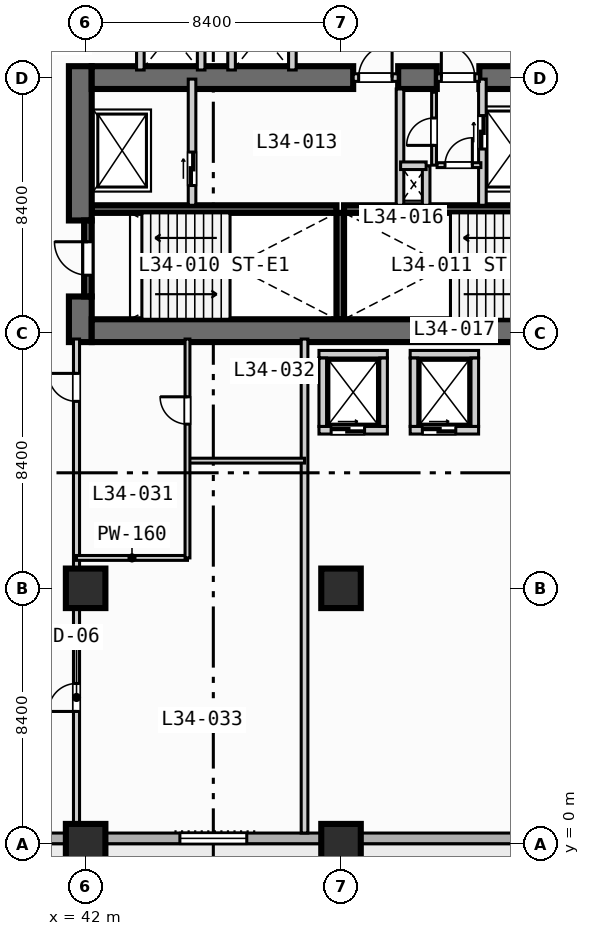
"""IFC4 building model, lengths in metres.
Left out: names, types, materials, properties, quantities, classifications, styles, units other than length and angle.
Written with IfcOpenShell. Run it as: python <this file> out.ifc"""

import sys

from ifc_helpers import new_model, si_unit, direction, frame, frame_2d, origin, origin_2d, place, context, subcontext, project, spatial, rectangle, extrude, element, fill, save


model = new_model("IFC4")
c1 = context("Model", 3, precision=1e-05, world=origin(), true_north=direction((0.0, 1.0)))
c2 = subcontext(c1, "Body", "Model", "MODEL_VIEW")
j1 = project(units=[si_unit("LENGTHUNIT", "METRE"), si_unit("PLANEANGLEUNIT", "RADIAN")], contexts=[c1])
p1 = place(None, origin())
s1 = spatial("IfcSite", under=j1, at=p1, CompositionType="ELEMENT")
p2 = place(p1, origin())
s2 = spatial("IfcBuilding", under=s1, at=p2, CompositionType="ELEMENT")
p3 = place(p2, frame((0.0, 0.0, 141.8)))
s3 = spatial("IfcBuildingStorey", under=s2, at=p3, CompositionType="ELEMENT", Elevation=141.8)
for number, where, z_axis, x_axis in (
    (1, (42.2, 20.875, 0.0), (0.0, 0.0, 1.0), (1.0, 0.0, 0.0)),
    (2, (50.5, 20.875, 0.0), (0.0, 0.0, 1.0), (1.0, 0.0, 0.0)),
):
    element("IfcWall", number, at=place(p3, frame(where, z_axis=z_axis, x_axis=x_axis)), inside=s3, PredefinedType="SOLIDWALL", context=c2, shape_type="SweptSolid", body=[
        extrude(rectangle(XDim=8.05, YDim=0.25, at=frame_2d((4.025, 0.0))), origin(), (0.0, 0.0, 1.0), 3.55),
    ])
p4 = place(p3, frame((50.375, 17.25, 0.0), z_axis=(0.0, 0.0, 1.0), x_axis=(0.0, 1.0, 0.0)))
e3 = element("IfcWall", 3, at=p4, inside=s3, PredefinedType="SOLIDWALL", context=c2, shape_type="SweptSolid", body=[
    extrude(rectangle(XDim=3.5, YDim=0.25, at=frame_2d((1.75, 0.0))), origin(), (0.0, 0.0, 1.0), 3.55),
])
p5 = place(p3, frame((41.825, 16.5, 0.0), z_axis=(0.0, 0.0, 1.0), x_axis=(0.0, 1.0, 0.0)))
e4 = element("IfcWall", 4, at=p5, inside=s3, PredefinedType="SHEAR", context=c2, shape_type="SweptSolid", body=[
    extrude(rectangle(XDim=1.5, YDim=0.75, at=frame_2d((0.75, 0.0))), origin(), (0.0, 0.0, 1.0), 3.55),
])
p6 = place(p3, frame((41.825, 20.5, 0.0), z_axis=(0.0, 0.0, 1.0), x_axis=(0.0, 1.0, 0.0)))
e5 = element("IfcWall", 5, at=p6, inside=s3, PredefinedType="SHEAR", context=c2, shape_type="SweptSolid", body=[
    extrude(rectangle(XDim=5.075, YDim=0.75, at=frame_2d((2.538, 0.0))), origin(), (0.0, 0.0, 1.0), 3.55),
])
p7 = place(p3, frame((42.2, 16.875, 0.0), z_axis=(0.0, 0.0, 1.0), x_axis=(1.0, 0.0, 0.0)))
e6 = element("IfcWall", 6, at=p7, inside=s3, PredefinedType="SHEAR", context=c2, shape_type="SweptSolid", body=[
    extrude(rectangle(XDim=16.35, YDim=0.75, at=frame_2d((8.175, 0.0))), origin(), (0.0, 0.0, 1.0), 3.55),
])
p8 = place(p3, frame((42.2, 25.2, 0.0), z_axis=(0.0, 0.0, 1.0), x_axis=(1.0, 0.0, 0.0)))
e7 = element("IfcWall", 7, at=p8, inside=s3, PredefinedType="SHEAR", context=c2, shape_type="SweptSolid", body=[
    extrude(rectangle(XDim=8.6, YDim=0.75, at=frame_2d((4.3, 0.0))), origin(), (0.0, 0.0, 1.0), 3.55),
])
p9 = place(p3, frame((52.28, 25.2, 0.0), z_axis=(0.0, 0.0, 1.0), x_axis=(1.0, 0.0, 0.0)))
e8 = element("IfcWall", 8, at=p9, inside=s3, PredefinedType="SHEAR", context=c2, shape_type="SweptSolid", body=[
    extrude(rectangle(XDim=1.27, YDim=0.75, at=frame_2d((0.635, 0.0))), origin(), (0.0, 0.0, 1.0), 3.55),
])
p10 = place(p3, frame((54.95, 25.2, 0.0), z_axis=(0.0, 0.0, 1.0), x_axis=(1.0, 0.0, 0.0)))
e9 = element("IfcWall", 9, at=p10, inside=s3, PredefinedType="SHEAR", context=c2, shape_type="SweptSolid", body=[
    extrude(rectangle(XDim=3.6, YDim=0.75, at=frame_2d((1.8, 0.0))), origin(), (0.0, 0.0, 1.0), 3.55),
])
for number, where, z_axis, x_axis in (
    (10, (42.0, 0.0, 0.0), (0.0, 0.0, 1.0), (1.0, 0.0, 0.0)),
    (11, (42.0, 8.4, 0.0), (0.0, 0.0, 1.0), (1.0, 0.0, 0.0)),
    (12, (50.4, 0.0, 0.0), (0.0, 0.0, 1.0), (1.0, 0.0, 0.0)),
    (13, (50.4, 8.4, 0.0), (0.0, 0.0, 1.0), (1.0, 0.0, 0.0)),
):
    element("IfcColumn", number, at=place(p3, frame(where, z_axis=z_axis, x_axis=x_axis)), inside=s3, PredefinedType="COLUMN", context=c2, shape_type="SweptSolid", body=[
        extrude(rectangle(XDim=1.3, YDim=1.3, at=origin_2d()), origin(), (0.0, 0.0, 1.0), 3.8),
    ])
p11 = place(p3, frame((72.425, 0.175, 0.0), z_axis=(0.0, 0.0, 1.0), x_axis=(-1.0, 0.0, 0.0)))
e14 = element("IfcWall", 14, at=p11, inside=s3, PredefinedType="STANDARD", context=c2, shape_type="SweptSolid", body=[
    extrude(rectangle(XDim=69.25, YDim=0.35, at=frame_2d((34.625, 0.0))), origin(), (0.0, 0.0, 1.0), 3.55),
])
p12 = place(p11, frame((51.725, 0.0, 0.0)))
e15 = element("IfcOpeningElement", 15, at=p12, cuts=e14, PredefinedType="OPENING", context=c2, shape_type="SweptSolid", body=[
    extrude(rectangle(XDim=1.4, YDim=2.2, at=frame_2d((0.7, 1.1))), frame((0.0, 0.185, 0.0), z_axis=(0.0, -1.0, 0.0), x_axis=(1.0, 0.0, 0.0)), (0.0, 0.0, 1.0), 0.37),
])
p13 = place(p11, frame((58.725, 0.0, 0.85)))
e16 = element("IfcOpeningElement", 16, at=p13, cuts=e14, PredefinedType="OPENING", context=c2, shape_type="SweptSolid", body=[
    extrude(rectangle(XDim=2.2, YDim=1.8, at=frame_2d((1.1, 0.9))), frame((0.0, 0.185, 0.0), z_axis=(0.0, -1.0, 0.0), x_axis=(1.0, 0.0, 0.0)), (0.0, 0.0, 1.0), 0.37),
])
p14 = place(p11, frame((41.925, 0.0, 0.85)))
e17 = element("IfcOpeningElement", 17, at=p14, cuts=e14, PredefinedType="OPENING", context=c2, shape_type="SweptSolid", body=[
    extrude(rectangle(XDim=2.2, YDim=1.8, at=frame_2d((1.1, 0.9))), frame((0.0, 0.185, 0.0), z_axis=(0.0, -1.0, 0.0), x_axis=(1.0, 0.0, 0.0)), (0.0, 0.0, 1.0), 0.37),
])
p15 = place(p11, frame((33.525, 0.0, 0.85)))
e18 = element("IfcOpeningElement", 18, at=p15, cuts=e14, PredefinedType="OPENING", context=c2, shape_type="SweptSolid", body=[
    extrude(rectangle(XDim=2.2, YDim=1.8, at=frame_2d((1.1, 0.9))), frame((0.0, 0.185, 0.0), z_axis=(0.0, -1.0, 0.0), x_axis=(1.0, 0.0, 0.0)), (0.0, 0.0, 1.0), 0.37),
])
p16 = place(p11, frame((25.125, 0.0, 0.85)))
e19 = element("IfcOpeningElement", 19, at=p16, cuts=e14, PredefinedType="OPENING", context=c2, shape_type="SweptSolid", body=[
    extrude(rectangle(XDim=2.2, YDim=1.8, at=frame_2d((1.1, 0.9))), frame((0.0, 0.185, 0.0), z_axis=(0.0, -1.0, 0.0), x_axis=(1.0, 0.0, 0.0)), (0.0, 0.0, 1.0), 0.37),
])
p17 = place(p3, frame((42.075, 18.0, 0.0), z_axis=(0.0, 0.0, 1.0), x_axis=(0.0, 1.0, 0.0)))
e20 = element("IfcWall", 20, at=p17, inside=s3, PredefinedType="SOLIDWALL", context=c2, shape_type="SweptSolid", body=[
    extrude(rectangle(XDim=2.5, YDim=0.25, at=frame_2d((1.25, 0.0))), origin(), (0.0, 0.0, 1.0), 3.55),
])
p18 = place(p17, frame((0.7, 0.0, 0.0)))
e21 = element("IfcOpeningElement", 21, at=p18, cuts=e20, PredefinedType="OPENING", context=c2, shape_type="SweptSolid", body=[
    extrude(rectangle(XDim=1.1, YDim=2.15, at=frame_2d((0.55, 1.075))), frame((0.0, 0.135, 0.0), z_axis=(0.0, -1.0, 0.0), x_axis=(1.0, 0.0, 0.0)), (0.0, 0.0, 1.0), 0.27),
])
p19 = place(p3, frame((45.5, 21.0, 0.0), z_axis=(0.0, 0.0, 1.0), x_axis=(0.0, 1.0, 0.0)))
e22 = element("IfcWall", 22, at=p19, inside=s3, PredefinedType="SOLIDWALL", context=c2, shape_type="SweptSolid", body=[
    extrude(rectangle(XDim=4.15, YDim=0.25, at=frame_2d((2.075, 0.0))), origin(), (0.0, 0.0, 1.0), 3.55),
])
p20 = place(p19, frame((0.65, 0.0, 0.0)))
e23 = element("IfcOpeningElement", 23, at=p20, cuts=e22, PredefinedType="OPENING", context=c2, shape_type="SweptSolid", body=[
    extrude(rectangle(XDim=1.1, YDim=2.15, at=frame_2d((0.55, 1.075))), frame((0.0, 0.135, 0.0), z_axis=(0.0, -1.0, 0.0), x_axis=(1.0, 0.0, 0.0)), (0.0, 0.0, 1.0), 0.27),
])
p21 = place(p3, frame((50.8, 25.2, 0.0), z_axis=(0.0, 0.0, 1.0), x_axis=(1.0, 0.0, 0.0)))
e24 = element("IfcWall", 24, at=p21, inside=s3, PredefinedType="SOLIDWALL", context=c2, shape_type="SweptSolid", body=[
    extrude(rectangle(XDim=1.48, YDim=0.25, at=frame_2d((0.74, 0.0))), origin(), (0.0, 0.0, 1.0), 3.55),
])
p22 = place(p21, frame((0.18, 0.0, 0.0)))
e25 = element("IfcOpeningElement", 25, at=p22, cuts=e24, PredefinedType="OPENING", context=c2, shape_type="SweptSolid", body=[
    extrude(rectangle(XDim=1.1, YDim=2.15, at=frame_2d((0.55, 1.075))), frame((0.0, 0.135, 0.0), z_axis=(0.0, -1.0, 0.0), x_axis=(1.0, 0.0, 0.0)), (0.0, 0.0, 1.0), 0.27),
])
p23 = place(p3, frame((52.34, 21.0, 0.0), z_axis=(0.0, 0.0, 1.0), x_axis=(0.0, 1.0, 0.0)))
e26 = element("IfcWall", 26, at=p23, inside=s3, PredefinedType="SOLIDWALL", context=c2, shape_type="SweptSolid", body=[
    extrude(rectangle(XDim=3.825, YDim=0.25, at=frame_2d((1.913, 0.0))), origin(), (0.0, 0.0, 1.0), 3.55),
])
p24 = place(p3, frame((55.05, 21.0, 0.0), z_axis=(0.0, 0.0, 1.0), x_axis=(0.0, 1.0, 0.0)))
e27 = element("IfcWall", 27, at=p24, inside=s3, PredefinedType="SOLIDWALL", context=c2, shape_type="SweptSolid", body=[
    extrude(rectangle(XDim=4.15, YDim=0.25, at=frame_2d((2.075, 0.0))), origin(), (0.0, 0.0, 1.0), 3.55),
])
p25 = place(p24, frame((1.85, 0.0, 0.0)))
e28 = element("IfcOpeningElement", 28, at=p25, cuts=e27, PredefinedType="OPENING", context=c2, shape_type="SweptSolid", body=[
    extrude(rectangle(XDim=1.1, YDim=2.15, at=frame_2d((0.55, 1.075))), frame((0.0, 0.135, 0.0), z_axis=(0.0, -1.0, 0.0), x_axis=(1.0, 0.0, 0.0)), (0.0, 0.0, 1.0), 0.27),
])
p26 = place(p3, frame((53.55, 25.2, 0.0), z_axis=(0.0, 0.0, 1.0), x_axis=(1.0, 0.0, 0.0)))
e29 = element("IfcWall", 29, at=p26, inside=s3, PredefinedType="SOLIDWALL", context=c2, shape_type="SweptSolid", body=[
    extrude(rectangle(XDim=1.4, YDim=0.25, at=frame_2d((0.7, 0.0))), origin(), (0.0, 0.0, 1.0), 3.55),
])
p27 = place(p26, frame((0.15, 0.0, 0.0)))
e30 = element("IfcOpeningElement", 30, at=p27, cuts=e29, PredefinedType="OPENING", context=c2, shape_type="SweptSolid", body=[
    extrude(rectangle(XDim=1.1, YDim=2.15, at=frame_2d((0.55, 1.075))), frame((0.0, 0.135, 0.0), z_axis=(0.0, -1.0, 0.0), x_axis=(1.0, 0.0, 0.0)), (0.0, 0.0, 1.0), 0.27),
])
p28 = place(p3, frame((53.2, 21.0, 0.0), z_axis=(0.0, 0.0, 1.0), x_axis=(0.0, 1.0, 0.0)))
e31 = element("IfcWall", 31, at=p28, inside=s3, PredefinedType="SOLIDWALL", context=c2, shape_type="SweptSolid", body=[
    extrude(rectangle(XDim=1.3, YDim=0.25, at=frame_2d((0.65, 0.0))), origin(), (0.0, 0.0, 1.0), 3.55),
])
p29 = place(p3, frame((52.36, 22.3, 0.0), z_axis=(0.0, 0.0, 1.0), x_axis=(1.0, 0.0, 0.0)))
e32 = element("IfcWall", 32, at=p29, inside=s3, PredefinedType="SOLIDWALL", context=c2, shape_type="SweptSolid", body=[
    extrude(rectangle(XDim=0.84, YDim=0.25, at=frame_2d((0.42, 0.0))), origin(), (0.0, 0.0, 1.0), 3.55),
])
p30 = place(p3, frame((53.56, 22.32, 0.0), z_axis=(0.0, 0.0, 1.0), x_axis=(1.0, 0.0, 0.0)))
e33 = element("IfcWall", 33, at=p30, inside=s3, PredefinedType="PARTITIONING", context=c2, shape_type="SweptSolid", body=[
    extrude(rectangle(XDim=1.44, YDim=0.16, at=frame_2d((0.72, 0.0))), origin(), (0.0, 0.0, 1.0), 3.55),
])
p31 = place(p30, frame((0.26, 0.0, 0.0)))
e34 = element("IfcOpeningElement", 34, at=p31, cuts=e33, PredefinedType="OPENING", context=c2, shape_type="SweptSolid", body=[
    extrude(rectangle(XDim=0.9, YDim=2.1, at=frame_2d((0.45, 1.05))), frame((0.0, 0.09, 0.0), z_axis=(0.0, -1.0, 0.0), x_axis=(1.0, 0.0, 0.0)), (0.0, 0.0, 1.0), 0.18),
])
p32 = place(p3, frame((53.46, 22.32, 0.0), z_axis=(0.0, 0.0, 1.0), x_axis=(0.0, 1.0, 0.0)))
e35 = element("IfcWall", 35, at=p32, inside=s3, PredefinedType="PARTITIONING", context=c2, shape_type="SweptSolid", body=[
    extrude(rectangle(XDim=2.4, YDim=0.16, at=frame_2d((1.2, 0.0))), origin(), (0.0, 0.0, 1.0), 3.55),
])
p33 = place(p32, frame((0.65, 0.0, 0.0)))
e36 = element("IfcOpeningElement", 36, at=p33, cuts=e35, PredefinedType="OPENING", context=c2, shape_type="SweptSolid", body=[
    extrude(rectangle(XDim=0.9, YDim=2.1, at=frame_2d((0.45, 1.05))), frame((0.0, 0.09, 0.0), z_axis=(0.0, -1.0, 0.0), x_axis=(1.0, 0.0, 0.0)), (0.0, 0.0, 1.0), 0.18),
])
p34 = place(p3, frame((49.675, 13.6, 0.0), z_axis=(0.0, 0.0, 1.0), x_axis=(1.0, 0.0, 0.0)))
e37 = element("IfcWall", 37, at=p34, inside=s3, PredefinedType="SOLIDWALL", context=c2, shape_type="SweptSolid", body=[
    extrude(rectangle(XDim=2.25, YDim=0.25, at=frame_2d((1.125, 0.0))), origin(), (0.0, 0.0, 1.0), 3.55),
])
p35 = place(p34, frame((0.4, 0.0, 0.0)))
e38 = element("IfcOpeningElement", 38, at=p35, cuts=e37, PredefinedType="OPENING", context=c2, shape_type="SweptSolid", body=[
    extrude(rectangle(XDim=1.1, YDim=2.15, at=frame_2d((0.55, 1.075))), frame((0.0, 0.135, 0.0), z_axis=(0.0, -1.0, 0.0), x_axis=(1.0, 0.0, 0.0)), (0.0, 0.0, 1.0), 0.27),
])
for number, where, z_axis, x_axis in (
    (39, (49.675, 16.1, 0.0), (0.0, 0.0, 1.0), (1.0, 0.0, 0.0)),
    (40, (49.8, 13.725, 0.0), (0.0, 0.0, 1.0), (0.0, 1.0, 0.0)),
    (41, (51.8, 13.725, 0.0), (0.0, 0.0, 1.0), (0.0, 1.0, 0.0)),
):
    element("IfcWall", number, at=place(p3, frame(where, z_axis=z_axis, x_axis=x_axis)), inside=s3, PredefinedType="SOLIDWALL", context=c2, shape_type="SweptSolid", body=[
        extrude(rectangle(XDim=2.25, YDim=0.25, at=frame_2d((1.125, 0.0))), origin(), (0.0, 0.0, 1.0), 3.55),
    ])
p36 = place(p3, frame((52.675, 13.6, 0.0), z_axis=(0.0, 0.0, 1.0), x_axis=(1.0, 0.0, 0.0)))
e42 = element("IfcWall", 42, at=p36, inside=s3, PredefinedType="SOLIDWALL", context=c2, shape_type="SweptSolid", body=[
    extrude(rectangle(XDim=2.25, YDim=0.25, at=frame_2d((1.125, 0.0))), origin(), (0.0, 0.0, 1.0), 3.55),
])
p37 = place(p36, frame((0.4, 0.0, 0.0)))
e43 = element("IfcOpeningElement", 43, at=p37, cuts=e42, PredefinedType="OPENING", context=c2, shape_type="SweptSolid", body=[
    extrude(rectangle(XDim=1.1, YDim=2.15, at=frame_2d((0.55, 1.075))), frame((0.0, 0.135, 0.0), z_axis=(0.0, -1.0, 0.0), x_axis=(1.0, 0.0, 0.0)), (0.0, 0.0, 1.0), 0.27),
])
for number, where, z_axis, x_axis in (
    (44, (52.675, 16.1, 0.0), (0.0, 0.0, 1.0), (1.0, 0.0, 0.0)),
    (45, (52.8, 13.725, 0.0), (0.0, 0.0, 1.0), (0.0, 1.0, 0.0)),
    (46, (54.8, 13.725, 0.0), (0.0, 0.0, 1.0), (0.0, 1.0, 0.0)),
):
    element("IfcWall", number, at=place(p3, frame(where, z_axis=z_axis, x_axis=x_axis)), inside=s3, PredefinedType="SOLIDWALL", context=c2, shape_type="SweptSolid", body=[
        extrude(rectangle(XDim=2.25, YDim=0.25, at=frame_2d((1.125, 0.0))), origin(), (0.0, 0.0, 1.0), 3.55),
    ])
for number, where, z_axis, x_axis in (
    (47, (43.8, 25.45, 0.0), (0.0, 0.0, 1.0), (0.0, 1.0, 0.0)),
    (48, (45.8, 25.45, 0.0), (0.0, 0.0, 1.0), (0.0, 1.0, 0.0)),
    (49, (46.8, 25.45, 0.0), (0.0, 0.0, 1.0), (0.0, 1.0, 0.0)),
    (50, (48.8, 25.45, 0.0), (0.0, 0.0, 1.0), (0.0, 1.0, 0.0)),
):
    element("IfcWall", number, at=place(p3, frame(where, z_axis=z_axis, x_axis=x_axis)), inside=s3, PredefinedType="SOLIDWALL", context=c2, shape_type="SweptSolid", body=[
        extrude(rectangle(XDim=2.325, YDim=0.25, at=frame_2d((1.163, 0.0))), origin(), (0.0, 0.0, 1.0), 3.55),
    ])
p38 = place(p3, frame((41.7, 0.35, 0.0), z_axis=(0.0, 0.0, 1.0), x_axis=(0.0, 1.0, 0.0)))
e51 = element("IfcWall", 51, at=p38, inside=s3, PredefinedType="PARTITIONING", context=c2, shape_type="SweptSolid", body=[
    extrude(rectangle(XDim=16.25, YDim=0.2, at=frame_2d((8.125, 0.0))), origin(), (0.0, 0.0, 1.0), 2.8),
])
p39 = place(p38, frame((4.0, 0.0, 0.0)))
e52 = element("IfcOpeningElement", 52, at=p39, cuts=e51, PredefinedType="OPENING", context=c2, shape_type="SweptSolid", body=[
    extrude(rectangle(XDim=0.92, YDim=2.1, at=frame_2d((0.46, 1.05))), frame((0.0, 0.11, 0.0), z_axis=(0.0, -1.0, 0.0), x_axis=(1.0, 0.0, 0.0)), (0.0, 0.0, 1.0), 0.22),
])
p40 = place(p38, frame((14.2, 0.0, 0.0)))
e53 = element("IfcOpeningElement", 53, at=p40, cuts=e51, PredefinedType="OPENING", context=c2, shape_type="SweptSolid", body=[
    extrude(rectangle(XDim=0.92, YDim=2.1, at=frame_2d((0.46, 1.05))), frame((0.0, 0.11, 0.0), z_axis=(0.0, -1.0, 0.0), x_axis=(1.0, 0.0, 0.0)), (0.0, 0.0, 1.0), 0.22),
])
p41 = place(p3, frame((49.2, 0.35, 0.0), z_axis=(0.0, 0.0, 1.0), x_axis=(0.0, 1.0, 0.0)))
e54 = element("IfcWall", 54, at=p41, inside=s3, PredefinedType="PARTITIONING", context=c2, shape_type="SweptSolid", body=[
    extrude(rectangle(XDim=16.25, YDim=0.22, at=frame_2d((8.125, 0.0))), origin(), (0.0, 0.0, 1.0), 3.55),
])
p42 = place(p3, frame((41.7, 9.4, 0.0), z_axis=(0.0, 0.0, 1.0), x_axis=(1.0, 0.0, 0.0)))
e55 = element("IfcWall", 55, at=p42, inside=s3, PredefinedType="PARTITIONING", context=c2, shape_type="SweptSolid", body=[
    extrude(rectangle(XDim=3.65, YDim=0.16, at=frame_2d((1.825, 0.0))), origin(), (0.0, 0.0, 1.0), 3.55),
])
p43 = place(p3, frame((45.35, 12.6, 0.0), z_axis=(0.0, 0.0, 1.0), x_axis=(1.0, 0.0, 0.0)))
e56 = element("IfcWall", 56, at=p43, inside=s3, PredefinedType="PARTITIONING", context=c2, shape_type="SweptSolid", body=[
    extrude(rectangle(XDim=3.85, YDim=0.16, at=frame_2d((1.925, 0.0))), origin(), (0.0, 0.0, 1.0), 3.55),
])
p44 = place(p3, frame((45.35, 9.4, 0.0), z_axis=(0.0, 0.0, 1.0), x_axis=(0.0, 1.0, 0.0)))
e57 = element("IfcWall", 57, at=p44, inside=s3, PredefinedType="PARTITIONING", context=c2, shape_type="SweptSolid", body=[
    extrude(rectangle(XDim=7.2, YDim=0.16, at=frame_2d((3.6, 0.0))), origin(), (0.0, 0.0, 1.0), 3.55),
])
p45 = place(p44, frame((4.4, 0.0, 0.0)))
e58 = element("IfcOpeningElement", 58, at=p45, cuts=e57, PredefinedType="OPENING", context=c2, shape_type="SweptSolid", body=[
    extrude(rectangle(XDim=0.9, YDim=2.1, at=frame_2d((0.45, 1.05))), frame((0.0, 0.09, 0.0), z_axis=(0.0, -1.0, 0.0), x_axis=(1.0, 0.0, 0.0)), (0.0, 0.0, 1.0), 0.18),
])
p46 = place(p16, origin())
e59 = element("IfcWindow", 59, at=p46, inside=s3, PartitioningType="SINGLE_PANEL", PredefinedType="WINDOW", context=c2, shape_type="SweptSolid", body=[
    extrude(rectangle(XDim=2.2, YDim=1.8, at=frame_2d((1.1, 0.9))), frame((0.0, 0.03, 0.0), z_axis=(0.0, -1.0, 0.0), x_axis=(1.0, 0.0, 0.0)), (0.0, 0.0, 1.0), 0.06),
])
fill(e19, e59)
p47 = place(p18, origin())
e60 = element("IfcDoor", 60, at=p47, inside=s3, OperationType="SINGLE_SWING_RIGHT", PredefinedType="DOOR", context=c2, shape_type="SweptSolid", body=[
    extrude(rectangle(XDim=1.1, YDim=2.15, at=frame_2d((0.55, 1.075))), frame((0.0, 0.025, 0.0), z_axis=(0.0, -1.0, 0.0), x_axis=(1.0, 0.0, 0.0)), (0.0, 0.0, 1.0), 0.05),
])
fill(e21, e60)
p48 = place(p20, origin())
e61 = element("IfcDoor", 61, at=p48, inside=s3, OperationType="SLIDING_TO_LEFT", PredefinedType="DOOR", context=c2, shape_type="SweptSolid", body=[
    extrude(rectangle(XDim=1.1, YDim=2.15, at=frame_2d((0.55, 1.075))), frame((0.0, 0.025, 0.0), z_axis=(0.0, -1.0, 0.0), x_axis=(1.0, 0.0, 0.0)), (0.0, 0.0, 1.0), 0.05),
])
fill(e23, e61)
p49 = place(p22, origin())
e62 = element("IfcDoor", 62, at=p49, inside=s3, OperationType="SINGLE_SWING_RIGHT", PredefinedType="DOOR", context=c2, shape_type="SweptSolid", body=[
    extrude(rectangle(XDim=1.1, YDim=2.15, at=frame_2d((0.55, 1.075))), frame((0.0, 0.025, 0.0), z_axis=(0.0, -1.0, 0.0), x_axis=(1.0, 0.0, 0.0)), (0.0, 0.0, 1.0), 0.05),
])
fill(e25, e62)
p50 = place(p25, origin())
e63 = element("IfcDoor", 63, at=p50, inside=s3, OperationType="SLIDING_TO_LEFT", PredefinedType="DOOR", context=c2, shape_type="SweptSolid", body=[
    extrude(rectangle(XDim=1.1, YDim=2.15, at=frame_2d((0.55, 1.075))), frame((0.0, 0.025, 0.0), z_axis=(0.0, -1.0, 0.0), x_axis=(1.0, 0.0, 0.0)), (0.0, 0.0, 1.0), 0.05),
])
fill(e28, e63)
p51 = place(p27, origin())
e64 = element("IfcDoor", 64, at=p51, inside=s3, OperationType="SINGLE_SWING_LEFT", PredefinedType="DOOR", context=c2, shape_type="SweptSolid", body=[
    extrude(rectangle(XDim=1.1, YDim=2.15, at=frame_2d((0.55, 1.075))), frame((0.0, 0.025, 0.0), z_axis=(0.0, -1.0, 0.0), x_axis=(1.0, 0.0, 0.0)), (0.0, 0.0, 1.0), 0.05),
])
fill(e30, e64)
p52 = place(p31, origin())
e65 = element("IfcDoor", 65, at=p52, inside=s3, OperationType="SINGLE_SWING_RIGHT", PredefinedType="DOOR", context=c2, shape_type="SweptSolid", body=[
    extrude(rectangle(XDim=0.9, YDim=2.1, at=frame_2d((0.45, 1.05))), frame((0.0, 0.025, 0.0), z_axis=(0.0, -1.0, 0.0), x_axis=(1.0, 0.0, 0.0)), (0.0, 0.0, 1.0), 0.05),
])
fill(e34, e65)
p53 = place(p33, origin())
e66 = element("IfcDoor", 66, at=p53, inside=s3, OperationType="SINGLE_SWING_LEFT", PredefinedType="DOOR", context=c2, shape_type="SweptSolid", body=[
    extrude(rectangle(XDim=0.9, YDim=2.1, at=frame_2d((0.45, 1.05))), frame((0.0, 0.025, 0.0), z_axis=(0.0, -1.0, 0.0), x_axis=(1.0, 0.0, 0.0)), (0.0, 0.0, 1.0), 0.05),
])
fill(e36, e66)
p54 = place(p35, origin())
e67 = element("IfcDoor", 67, at=p54, inside=s3, OperationType="SLIDING_TO_LEFT", PredefinedType="DOOR", context=c2, shape_type="SweptSolid", body=[
    extrude(rectangle(XDim=1.1, YDim=2.15, at=frame_2d((0.55, 1.075))), frame((0.0, 0.025, 0.0), z_axis=(0.0, -1.0, 0.0), x_axis=(1.0, 0.0, 0.0)), (0.0, 0.0, 1.0), 0.05),
])
fill(e38, e67)
p55 = place(p37, origin())
e68 = element("IfcDoor", 68, at=p55, inside=s3, OperationType="SLIDING_TO_LEFT", PredefinedType="DOOR", context=c2, shape_type="SweptSolid", body=[
    extrude(rectangle(XDim=1.1, YDim=2.15, at=frame_2d((0.55, 1.075))), frame((0.0, 0.025, 0.0), z_axis=(0.0, -1.0, 0.0), x_axis=(1.0, 0.0, 0.0)), (0.0, 0.0, 1.0), 0.05),
])
fill(e43, e68)
p56 = place(p39, origin())
e69 = element("IfcDoor", 69, at=p56, inside=s3, OperationType="SINGLE_SWING_LEFT", PredefinedType="DOOR", context=c2, shape_type="SweptSolid", body=[
    extrude(rectangle(XDim=0.92, YDim=2.1, at=frame_2d((0.46, 1.05))), frame((0.0, 0.025, 0.0), z_axis=(0.0, -1.0, 0.0), x_axis=(1.0, 0.0, 0.0)), (0.0, 0.0, 1.0), 0.05),
])
fill(e52, e69)
p57 = place(p40, origin())
e70 = element("IfcDoor", 70, at=p57, inside=s3, OperationType="SINGLE_SWING_RIGHT", PredefinedType="DOOR", context=c2, shape_type="SweptSolid", body=[
    extrude(rectangle(XDim=0.92, YDim=2.1, at=frame_2d((0.46, 1.05))), frame((0.0, 0.025, 0.0), z_axis=(0.0, -1.0, 0.0), x_axis=(1.0, 0.0, 0.0)), (0.0, 0.0, 1.0), 0.05),
])
fill(e53, e70)
p58 = place(p45, origin())
e71 = element("IfcDoor", 71, at=p58, inside=s3, OperationType="SINGLE_SWING_RIGHT", PredefinedType="DOOR", context=c2, shape_type="SweptSolid", body=[
    extrude(rectangle(XDim=0.9, YDim=2.1, at=frame_2d((0.45, 1.05))), frame((0.0, 0.025, 0.0), z_axis=(0.0, -1.0, 0.0), x_axis=(1.0, 0.0, 0.0)), (0.0, 0.0, 1.0), 0.05),
])
fill(e58, e71)
save(model, sys.argv[1])
